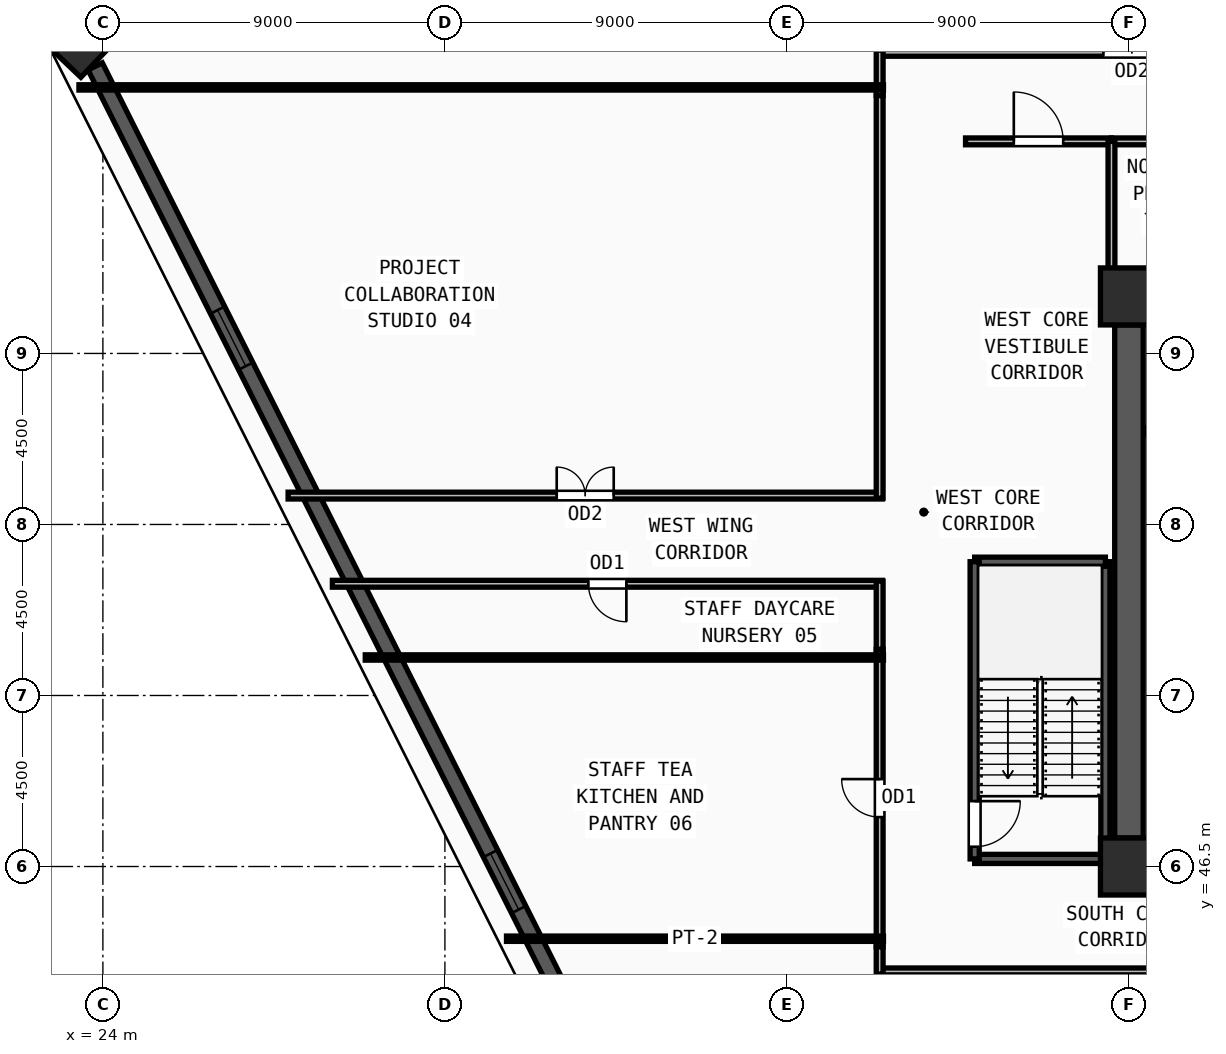
"""IFC4 building model, lengths in metres.
Left out: names, types, materials, properties, quantities, classifications, styles, units other than length and angle.
Written with IfcOpenShell. Run it as: python <this file> out.ifc"""

import sys

from ifc_helpers import new_model, si_unit, direction, frame, frame_2d, origin, origin_2d, place, context, subcontext, project, spatial, rectangle, extrude, source, transform, mapped, element, fill, save


model = new_model("IFC4")
c1 = context("Model", 3, precision=1e-05, world=origin(), true_north=direction((0.0, 1.0)))
c2 = subcontext(c1, "Body", "Model", "MODEL_VIEW")
j1 = project(units=[si_unit("LENGTHUNIT", "METRE"), si_unit("PLANEANGLEUNIT", "RADIAN")], contexts=[c1])
p1 = place(None, origin())
s1 = spatial("IfcSite", under=j1, at=p1, CompositionType="ELEMENT")
p2 = place(p1, origin())
s2 = spatial("IfcBuilding", under=s1, at=p2, CompositionType="ELEMENT")
p3 = place(p2, frame((0.0, 0.0, 113.25)))
s3 = spatial("IfcBuildingStorey", under=s2, at=p3, CompositionType="ELEMENT", Elevation=113.25)
m1 = source(origin(), c2, "Body", "SweptSolid", [
    extrude(rectangle(XDim=1.5, YDim=1.5, at=origin_2d()), origin(), (0.0, 0.0, 1.0), 3.75),
])
for number, where, z_axis, x_axis in (
    (1, (51.0, 46.5, 0.0), (0.0, 0.0, 1.0), (1.0, 0.0, 0.0)),
    (2, (51.0, 61.5, 0.0), (0.0, 0.0, 1.0), (1.0, 0.0, 0.0)),
):
    element("IfcColumn", number, at=place(p3, frame(where, z_axis=z_axis, x_axis=x_axis)), inside=s3, PredefinedType="COLUMN", context=c2, shape_type="MappedRepresentation", body=[
        mapped(m1, transform((0.0, 0.0, 0.0), x_axis=(1.0, 0.0, 0.0), y_axis=(0.0, 1.0, 0.0), z_axis=(0.0, 0.0, 1.0), scale=1.0)),
    ])
m2 = source(origin(), c2, "Body", "SweptSolid", [
    extrude(rectangle(XDim=1.4, YDim=1.15, at=origin_2d()), origin(), (0.0, 0.0, 1.0), 3.75),
])
p4 = place(p3, frame((23.487, 68.17, 0.0), z_axis=(0.0, 0.0, 1.0), x_axis=(0.68936671806, 0.724412539946, 0.0)))
e3 = element("IfcColumn", 3, at=p4, inside=s3, PredefinedType="COLUMN", context=c2, shape_type="MappedRepresentation", body=[
    mapped(m2, transform((0.0, 0.0, 0.0), x_axis=(1.0, 0.0, 0.0), y_axis=(0.0, 1.0, 0.0), z_axis=(0.0, 0.0, 1.0), scale=1.0)),
])
p5 = place(p3, frame((23.797, 67.553, 0.0), z_axis=(0.0, 0.0, 1.0), x_axis=(0.448851439989, -0.893606392558, 0.0)))
e4 = element("IfcWall", 4, at=p5, inside=s3, PredefinedType="SOLIDWALL", context=c2, shape_type="SweptSolid", body=[
    extrude(rectangle(XDim=32.004, YDim=0.42, at=frame_2d((16.002, 0.0))), origin(), (0.0, 0.0, 1.0), 3.57),
])
m3 = source(origin(), c2, "Body", "SweptSolid", [
    extrude(rectangle(XDim=1.65, YDim=1.95, at=frame_2d((0.825, 0.975))), frame((0.0, 0.22, 0.0), z_axis=(0.0, -1.0, 0.0), x_axis=(1.0, 0.0, 0.0)), (0.0, 0.0, 1.0), 0.44),
])
p6 = place(p5, frame((7.176, 0.0, 0.55)))
e5 = element("IfcOpeningElement", 5, at=p6, cuts=e4, PredefinedType="OPENING", context=c2, shape_type="MappedRepresentation", body=[
    mapped(m3, transform((0.0, 0.0, 0.0), x_axis=(1.0, 0.0, 0.0), y_axis=(0.0, 1.0, 0.0), z_axis=(0.0, 0.0, 1.0), scale=1.0)),
])
p7 = place(p5, frame((23.178, 0.0, 0.55)))
e6 = element("IfcOpeningElement", 6, at=p7, cuts=e4, PredefinedType="OPENING", context=c2, shape_type="MappedRepresentation", body=[
    mapped(m3, transform((0.0, 0.0, 0.0), x_axis=(1.0, 0.0, 0.0), y_axis=(0.0, 1.0, 0.0), z_axis=(0.0, 0.0, 1.0), scale=1.0)),
])
p8 = place(p3, frame((51.0, 47.25, 0.0), z_axis=(0.0, 0.0, 1.0), x_axis=(0.0, 1.0, 0.0)))
e7 = element("IfcWall", 7, at=p8, inside=s3, PredefinedType="SHEAR", context=c2, shape_type="SweptSolid", body=[
    extrude(rectangle(XDim=13.5, YDim=0.75, at=frame_2d((6.75, 0.0))), origin(), (0.0, 0.0, 1.0), 3.57),
])
p9 = place(p3, frame((46.94, 46.7, 0.0), z_axis=(0.0, 0.0, 1.0), x_axis=(1.0, 0.0, 0.0)))
e8 = element("IfcWall", 8, at=p9, inside=s3, PredefinedType="SOLIDWALL", context=c2, shape_type="SweptSolid", body=[
    extrude(rectangle(XDim=3.44, YDim=0.24, at=frame_2d((1.72, 0.0))), origin(), (0.0, 0.0, 1.0), 3.57),
])
p10 = place(p3, frame((50.38, 46.7, 0.0), z_axis=(0.0, 0.0, 1.0), x_axis=(0.0, 1.0, 0.0)))
e9 = element("IfcWall", 9, at=p10, inside=s3, PredefinedType="SOLIDWALL", context=c2, shape_type="SweptSolid", body=[
    extrude(rectangle(XDim=7.82, YDim=0.24, at=frame_2d((3.91, 0.0))), origin(), (0.0, 0.0, 1.0), 3.57),
])
p11 = place(p3, frame((50.38, 54.52, 0.0), z_axis=(0.0, 0.0, 1.0), x_axis=(-1.0, 0.0, 0.0)))
e10 = element("IfcWall", 10, at=p11, inside=s3, PredefinedType="SOLIDWALL", context=c2, shape_type="SweptSolid", body=[
    extrude(rectangle(XDim=3.44, YDim=0.24, at=frame_2d((1.72, 0.0))), origin(), (0.0, 0.0, 1.0), 3.57),
])
p12 = place(p3, frame((46.94, 54.52, 0.0), z_axis=(0.0, 0.0, 1.0), x_axis=(0.0, -1.0, 0.0)))
e11 = element("IfcWall", 11, at=p12, inside=s3, PredefinedType="SOLIDWALL", context=c2, shape_type="SweptSolid", body=[
    extrude(rectangle(XDim=7.82, YDim=0.24, at=frame_2d((3.91, 0.0))), origin(), (0.0, 0.0, 1.0), 3.57),
])
m4 = source(origin(), c2, "Body", "SweptSolid", [
    extrude(rectangle(XDim=1.2, YDim=2.2, at=frame_2d((0.6, 1.1))), frame((0.0, 0.13, 0.0), z_axis=(0.0, -1.0, 0.0), x_axis=(1.0, 0.0, 0.0)), (0.0, 0.0, 1.0), 0.26),
])
p13 = place(p12, frame((6.3, 0.0, 0.0)))
e12 = element("IfcOpeningElement", 12, at=p13, cuts=e11, PredefinedType="OPENING", context=c2, shape_type="MappedRepresentation", body=[
    mapped(m4, transform((0.0, 0.0, 0.0), x_axis=(1.0, 0.0, 0.0), y_axis=(0.0, 1.0, 0.0), z_axis=(0.0, 0.0, 1.0), scale=1.0)),
])
for number, where, z_axis, x_axis in (
    (13, (51.4, 57.95, 0.0), (0.0, 0.0, 1.0), (1.0, 0.0, 0.0)),
    (14, (53.8, 60.88, 0.0), (0.0, 0.0, 1.0), (-1.0, 0.0, 0.0)),
):
    element("IfcWall", number, at=place(p3, frame(where, z_axis=z_axis, x_axis=x_axis)), inside=s3, PredefinedType="SOLIDWALL", context=c2, shape_type="SweptSolid", body=[
        extrude(rectangle(XDim=2.4, YDim=0.2, at=frame_2d((1.2, 0.0))), origin(), (0.0, 0.0, 1.0), 3.57),
    ])
p14 = place(p3, frame((50.54, 65.58, 0.0), z_axis=(0.0, 0.0, 1.0), x_axis=(1.0, 0.0, 0.0)))
e15 = element("IfcWall", 15, at=p14, inside=s3, PredefinedType="PARTITIONING", context=c2, shape_type="SweptSolid", body=[
    extrude(rectangle(XDim=3.87, YDim=0.18, at=frame_2d((1.935, 0.0))), origin(), (0.0, 0.0, 1.0), 3.57),
])
m5 = source(origin(), c2, "Body", "SweptSolid", [
    extrude(rectangle(XDim=1.0, YDim=2.2, at=frame_2d((0.5, 1.1))), frame((0.0, 0.1, 0.0), z_axis=(0.0, -1.0, 0.0), x_axis=(1.0, 0.0, 0.0)), (0.0, 0.0, 1.0), 0.2),
])
p15 = place(p14, frame((1.435, 0.0, 0.0)))
e16 = element("IfcOpeningElement", 16, at=p15, cuts=e15, PredefinedType="OPENING", context=c2, shape_type="MappedRepresentation", body=[
    mapped(m5, transform((0.0, 0.0, 0.0), x_axis=(1.0, 0.0, 0.0), y_axis=(0.0, 1.0, 0.0), z_axis=(0.0, 0.0, 1.0), scale=1.0)),
])
p16 = place(p3, frame((46.7, 65.58, 0.0), z_axis=(0.0, 0.0, 1.0), x_axis=(1.0, 0.0, 0.0)))
e17 = element("IfcWall", 17, at=p16, inside=s3, PredefinedType="PARTITIONING", context=c2, shape_type="SweptSolid", body=[
    extrude(rectangle(XDim=3.84, YDim=0.18, at=frame_2d((1.92, 0.0))), origin(), (0.0, 0.0, 1.0), 3.57),
])
m6 = source(origin(), c2, "Body", "SweptSolid", [
    extrude(rectangle(XDim=1.3, YDim=2.2, at=frame_2d((0.65, 1.1))), frame((0.0, 0.1, 0.0), z_axis=(0.0, -1.0, 0.0), x_axis=(1.0, 0.0, 0.0)), (0.0, 0.0, 1.0), 0.2),
])
p17 = place(p16, frame((1.27, 0.0, 0.0)))
e18 = element("IfcOpeningElement", 18, at=p17, cuts=e17, PredefinedType="OPENING", context=c2, shape_type="MappedRepresentation", body=[
    mapped(m6, transform((0.0, 0.0, 0.0), x_axis=(1.0, 0.0, 0.0), y_axis=(0.0, 1.0, 0.0), z_axis=(0.0, 0.0, 1.0), scale=1.0)),
])
p18 = place(p3, frame((44.37, 67.91, 0.0), z_axis=(0.0, 0.0, 1.0), x_axis=(1.0, 0.0, 0.0)))
e19 = element("IfcWall", 19, at=p18, inside=s3, PredefinedType="PARTITIONING", context=c2, shape_type="SweptSolid", body=[
    extrude(rectangle(XDim=13.415, YDim=0.18, at=frame_2d((6.708, 0.0))), origin(), (0.0, 0.0, 1.0), 3.57),
])
m7 = source(origin(), c2, "Body", "SweptSolid", [
    extrude(rectangle(XDim=1.5, YDim=2.2, at=frame_2d((0.75, 1.1))), frame((0.0, 0.1, 0.0), z_axis=(0.0, -1.0, 0.0), x_axis=(1.0, 0.0, 0.0)), (0.0, 0.0, 1.0), 0.2),
])
p19 = place(p18, frame((5.957, 0.0, 0.0)))
e20 = element("IfcOpeningElement", 20, at=p19, cuts=e19, PredefinedType="OPENING", context=c2, shape_type="MappedRepresentation", body=[
    mapped(m7, transform((0.0, 0.0, 0.0), x_axis=(1.0, 0.0, 0.0), y_axis=(0.0, 1.0, 0.0), z_axis=(0.0, 0.0, 1.0), scale=1.0)),
])
p20 = place(p3, frame((28.874, 56.26, 0.0), z_axis=(0.0, 0.0, 1.0), x_axis=(1.0, 0.0, 0.0)))
e21 = element("IfcWall", 21, at=p20, inside=s3, PredefinedType="PARTITIONING", context=c2, shape_type="SweptSolid", body=[
    extrude(rectangle(XDim=15.636, YDim=0.18, at=frame_2d((7.818, 0.0))), origin(), (0.0, 0.0, 1.0), 3.57),
])
p21 = place(p20, frame((7.068, 0.0, 0.0)))
e22 = element("IfcOpeningElement", 22, at=p21, cuts=e21, PredefinedType="OPENING", context=c2, shape_type="MappedRepresentation", body=[
    mapped(m7, transform((0.0, 0.0, 0.0), x_axis=(1.0, 0.0, 0.0), y_axis=(0.0, 1.0, 0.0), z_axis=(0.0, 0.0, 1.0), scale=1.0)),
])
p22 = place(p3, frame((44.51, 53.94, 0.0), z_axis=(0.0, 0.0, 1.0), x_axis=(-1.0, 0.0, 0.0)))
e23 = element("IfcWall", 23, at=p22, inside=s3, PredefinedType="PARTITIONING", context=c2, shape_type="SweptSolid", body=[
    extrude(rectangle(XDim=14.471, YDim=0.18, at=frame_2d((7.235, 0.0))), origin(), (0.0, 0.0, 1.0), 3.57),
])
p23 = place(p22, frame((6.735, 0.0, 0.0)))
e24 = element("IfcOpeningElement", 24, at=p23, cuts=e23, PredefinedType="OPENING", context=c2, shape_type="MappedRepresentation", body=[
    mapped(m5, transform((0.0, 0.0, 0.0), x_axis=(1.0, 0.0, 0.0), y_axis=(0.0, 1.0, 0.0), z_axis=(0.0, 0.0, 1.0), scale=1.0)),
])
p24 = place(p3, frame((44.44, 44.385, 0.0), z_axis=(0.0, 0.0, 1.0), x_axis=(0.0, 1.0, 0.0)))
e25 = element("IfcWall", 25, at=p24, inside=s3, PredefinedType="PARTITIONING", context=c2, shape_type="SweptSolid", body=[
    extrude(rectangle(XDim=7.83, YDim=0.18, at=frame_2d((3.915, 0.0))), origin(), (0.0, 0.0, 1.0), 3.57),
])
p25 = place(p24, frame((3.415, 0.0, 0.0)))
e26 = element("IfcOpeningElement", 26, at=p25, cuts=e25, PredefinedType="OPENING", context=c2, shape_type="MappedRepresentation", body=[
    mapped(m5, transform((0.0, 0.0, 0.0), x_axis=(1.0, 0.0, 0.0), y_axis=(0.0, 1.0, 0.0), z_axis=(0.0, 0.0, 1.0), scale=1.0)),
])
p26 = place(p3, frame((75.63, 43.74, 0.0), z_axis=(0.0, 0.0, 1.0), x_axis=(-1.0, 0.0, 0.0)))
e27 = element("IfcWall", 27, at=p26, inside=s3, PredefinedType="PARTITIONING", context=c2, shape_type="SweptSolid", body=[
    extrude(rectangle(XDim=31.26, YDim=0.18, at=frame_2d((15.63, 0.0))), origin(), (0.0, 0.0, 1.0), 3.57),
])
p27 = place(p26, frame((10.08, 0.0, 0.0)))
e28 = element("IfcOpeningElement", 28, at=p27, cuts=e27, PredefinedType="OPENING", context=c2, shape_type="MappedRepresentation", body=[
    mapped(m7, transform((0.0, 0.0, 0.0), x_axis=(1.0, 0.0, 0.0), y_axis=(0.0, 1.0, 0.0), z_axis=(0.0, 0.0, 1.0), scale=1.0)),
])
p28 = place(p3, frame((50.54, 61.95, 0.0), z_axis=(0.0, 0.0, 1.0), x_axis=(0.0, 1.0, 0.0)))
e29 = element("IfcWall", 29, at=p28, inside=s3, PredefinedType="PARTITIONING", context=c2, shape_type="SweptSolid", body=[
    extrude(rectangle(XDim=3.63, YDim=0.18, at=frame_2d((1.815, 0.0))), origin(), (0.0, 0.0, 1.0), 3.57),
])
p29 = place(p3, frame((44.44, 66.785, 0.0), z_axis=(0.0, 0.0, 1.0), x_axis=(0.0, 1.0, 0.0)))
e30 = element("IfcWall", 30, at=p29, inside=s3, PredefinedType="PARTITIONING", context=c2, shape_type="SweptSolid", body=[
    extrude(rectangle(XDim=1.195, YDim=0.18, at=frame_2d((0.598, 0.0))), origin(), (0.0, 0.0, 1.0), 3.57),
])
p30 = place(p3, frame((44.44, 56.19, 0.0), z_axis=(0.0, 0.0, 1.0), x_axis=(0.0, 1.0, 0.0)))
e31 = element("IfcWall", 31, at=p30, inside=s3, PredefinedType="PARTITIONING", context=c2, shape_type="SweptSolid", body=[
    extrude(rectangle(XDim=10.595, YDim=0.18, at=frame_2d((5.297, 0.0))), origin(), (0.0, 0.0, 1.0), 3.57),
])
p31 = place(p3, frame((44.44, 52.215, 0.0), z_axis=(0.0, 0.0, 1.0), x_axis=(0.0, 1.0, 0.0)))
e32 = element("IfcWall", 32, at=p31, inside=s3, PredefinedType="PARTITIONING", context=c2, shape_type="SweptSolid", body=[
    extrude(rectangle(XDim=1.795, YDim=0.18, at=frame_2d((0.897, 0.0))), origin(), (0.0, 0.0, 1.0), 3.57),
])
p32 = place(p3, frame((44.44, 43.67, 0.0), z_axis=(0.0, 0.0, 1.0), x_axis=(0.0, 1.0, 0.0)))
e33 = element("IfcWall", 33, at=p32, inside=s3, PredefinedType="PARTITIONING", context=c2, shape_type="SweptSolid", body=[
    extrude(rectangle(XDim=0.715, YDim=0.18, at=frame_2d((0.357, 0.0))), origin(), (0.0, 0.0, 1.0), 3.57),
])
p33 = place(p3, frame((44.54, 44.6, 0.0), z_axis=(0.0, 0.0, 1.0), x_axis=(-1.0, 0.0, 0.0)))
e34 = element("IfcWall", 34, at=p33, inside=s3, PredefinedType="PARTITIONING", context=c2, shape_type="SweptSolid", body=[
    extrude(rectangle(XDim=9.919, YDim=0.14, at=frame_2d((4.959, 0.0))), origin(), (0.0, 0.0, 1.0), 3.57),
])
p34 = place(p3, frame((44.54, 52.0, 0.0), z_axis=(0.0, 0.0, 1.0), x_axis=(-1.0, 0.0, 0.0)))
e35 = element("IfcWall", 35, at=p34, inside=s3, PredefinedType="PARTITIONING", context=c2, shape_type="SweptSolid", body=[
    extrude(rectangle(XDim=13.636, YDim=0.14, at=frame_2d((6.818, 0.0))), origin(), (0.0, 0.0, 1.0), 3.57),
])
p35 = place(p3, frame((44.54, 67.0, 0.0), z_axis=(0.0, 0.0, 1.0), x_axis=(-1.0, 0.0, 0.0)))
e36 = element("IfcWall", 36, at=p35, inside=s3, PredefinedType="PARTITIONING", context=c2, shape_type="SweptSolid", body=[
    extrude(rectangle(XDim=21.17, YDim=0.14, at=frame_2d((10.585, 0.0))), origin(), (0.0, 0.0, 1.0), 2.755),
])
m8 = source(origin(), c2, "Body", "SweptSolid", [
    extrude(rectangle(XDim=1.65, YDim=1.95, at=frame_2d((0.825, 0.975))), frame((0.0, 0.03, 0.0), z_axis=(0.0, -1.0, 0.0), x_axis=(1.0, 0.0, 0.0)), (0.0, 0.0, 1.0), 0.06),
])
p36 = place(p6, origin())
e37 = element("IfcWindow", 37, at=p36, inside=s3, PartitioningType="DOUBLE_PANEL_VERTICAL", PredefinedType="WINDOW", context=c2, shape_type="MappedRepresentation", body=[
    mapped(m8, transform((0.0, 0.0, 0.0), x_axis=(1.0, 0.0, 0.0), y_axis=(0.0, 1.0, 0.0), z_axis=(0.0, 0.0, 1.0), scale=1.0)),
])
fill(e5, e37)
p37 = place(p7, origin())
e38 = element("IfcWindow", 38, at=p37, inside=s3, PartitioningType="DOUBLE_PANEL_VERTICAL", PredefinedType="WINDOW", context=c2, shape_type="MappedRepresentation", body=[
    mapped(m8, transform((0.0, 0.0, 0.0), x_axis=(1.0, 0.0, 0.0), y_axis=(0.0, 1.0, 0.0), z_axis=(0.0, 0.0, 1.0), scale=1.0)),
])
fill(e6, e38)
m9 = source(origin(), c2, "Body", "SweptSolid", [
    extrude(rectangle(XDim=1.2, YDim=2.2, at=frame_2d((0.6, 1.1))), frame((0.0, 0.025, 0.0), z_axis=(0.0, -1.0, 0.0), x_axis=(1.0, 0.0, 0.0)), (0.0, 0.0, 1.0), 0.05),
])
p38 = place(p13, origin())
e39 = element("IfcDoor", 39, at=p38, inside=s3, OperationType="SINGLE_SWING_LEFT", PredefinedType="DOOR", context=c2, shape_type="MappedRepresentation", body=[
    mapped(m9, transform((0.0, 0.0, 0.0), x_axis=(1.0, 0.0, 0.0), y_axis=(0.0, 1.0, 0.0), z_axis=(0.0, 0.0, 1.0), scale=1.0)),
])
fill(e12, e39)
m10 = source(origin(), c2, "Body", "SweptSolid", [
    extrude(rectangle(XDim=1.3, YDim=2.2, at=frame_2d((0.65, 1.1))), frame((0.0, 0.025, 0.0), z_axis=(0.0, -1.0, 0.0), x_axis=(1.0, 0.0, 0.0)), (0.0, 0.0, 1.0), 0.05),
])
p39 = place(p17, origin())
e40 = element("IfcDoor", 40, at=p39, inside=s3, OperationType="SINGLE_SWING_LEFT", PredefinedType="DOOR", context=c2, shape_type="MappedRepresentation", body=[
    mapped(m10, transform((0.0, 0.0, 0.0), x_axis=(1.0, 0.0, 0.0), y_axis=(0.0, 1.0, 0.0), z_axis=(0.0, 0.0, 1.0), scale=1.0)),
])
fill(e18, e40)
m11 = source(origin(), c2, "Body", "SweptSolid", [
    extrude(rectangle(XDim=1.5, YDim=2.2, at=frame_2d((0.75, 1.1))), frame((0.0, 0.025, 0.0), z_axis=(0.0, -1.0, 0.0), x_axis=(1.0, 0.0, 0.0)), (0.0, 0.0, 1.0), 0.05),
])
p40 = place(p19, origin())
e41 = element("IfcDoor", 41, at=p40, inside=s3, OperationType="DOUBLE_DOOR_SINGLE_SWING", PredefinedType="DOOR", context=c2, shape_type="MappedRepresentation", body=[
    mapped(m11, transform((0.0, 0.0, 0.0), x_axis=(1.0, 0.0, 0.0), y_axis=(0.0, 1.0, 0.0), z_axis=(0.0, 0.0, 1.0), scale=1.0)),
])
fill(e20, e41)
p41 = place(p21, origin())
e42 = element("IfcDoor", 42, at=p41, inside=s3, OperationType="DOUBLE_DOOR_SINGLE_SWING", PredefinedType="DOOR", context=c2, shape_type="MappedRepresentation", body=[
    mapped(m11, transform((0.0, 0.0, 0.0), x_axis=(1.0, 0.0, 0.0), y_axis=(0.0, 1.0, 0.0), z_axis=(0.0, 0.0, 1.0), scale=1.0)),
])
fill(e22, e42)
m12 = source(origin(), c2, "Body", "SweptSolid", [
    extrude(rectangle(XDim=1.0, YDim=2.2, at=frame_2d((0.5, 1.1))), frame((0.0, 0.025, 0.0), z_axis=(0.0, -1.0, 0.0), x_axis=(1.0, 0.0, 0.0)), (0.0, 0.0, 1.0), 0.05),
])
p42 = place(p23, origin())
e43 = element("IfcDoor", 43, at=p42, inside=s3, OperationType="SINGLE_SWING_LEFT", PredefinedType="DOOR", context=c2, shape_type="MappedRepresentation", body=[
    mapped(m12, transform((0.0, 0.0, 0.0), x_axis=(1.0, 0.0, 0.0), y_axis=(0.0, 1.0, 0.0), z_axis=(0.0, 0.0, 1.0), scale=1.0)),
])
fill(e24, e43)
p43 = place(p25, origin())
e44 = element("IfcDoor", 44, at=p43, inside=s3, OperationType="SINGLE_SWING_RIGHT", PredefinedType="DOOR", context=c2, shape_type="MappedRepresentation", body=[
    mapped(m12, transform((0.0, 0.0, 0.0), x_axis=(1.0, 0.0, 0.0), y_axis=(0.0, 1.0, 0.0), z_axis=(0.0, 0.0, 1.0), scale=1.0)),
])
fill(e26, e44)
save(model, sys.argv[1])
